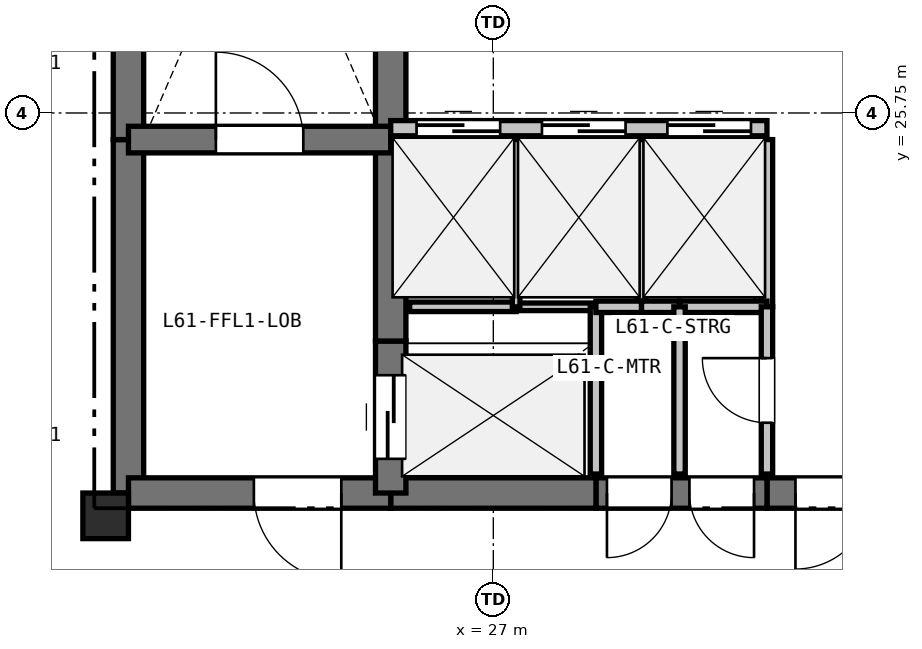
"""IFC4 building model, lengths in metres.
Left out: names, types, materials, properties, quantities, classifications, styles, units other than length and angle.
Written with IfcOpenShell. Run it as: python <this file> out.ifc"""

import sys

from ifc_helpers import new_model, si_unit, direction, frame, frame_2d, origin, origin_2d, place, context, subcontext, project, spatial, rectangle, extrude, element, fill, save


model = new_model("IFC4")
c1 = context("Model", 3, precision=1e-05, world=origin(), true_north=direction((0.0, 1.0)))
c2 = subcontext(c1, "Body", "Model", "MODEL_VIEW")
j1 = project(units=[si_unit("LENGTHUNIT", "METRE"), si_unit("PLANEANGLEUNIT", "RADIAN")], contexts=[c1])
p1 = place(None, origin())
s1 = spatial("IfcSite", under=j1, at=p1, CompositionType="ELEMENT")
p2 = place(p1, origin())
s2 = spatial("IfcBuilding", under=s1, at=p2, CompositionType="ELEMENT")
p3 = place(p2, frame((0.0, 0.0, 218.4)))
s3 = spatial("IfcBuildingStorey", under=s2, at=p3, CompositionType="ELEMENT", Elevation=218.4)
p4 = place(p3, frame((21.9, 20.45, 0.0), z_axis=(0.0, 0.0, 1.0), x_axis=(1.0, 0.0, 0.0)))
e1 = element("IfcColumn", 1, at=p4, inside=s3, PredefinedType="COLUMN", context=c2, shape_type="SweptSolid", body=[
    extrude(rectangle(XDim=0.6, YDim=0.6, at=origin_2d()), origin(), (0.0, 0.0, 1.0), 4.8),
])
p5 = place(p3, frame((22.2, 20.75, 0.0), z_axis=(0.0, 0.0, 1.0), x_axis=(0.0, 1.0, 0.0)))
e2 = element("IfcWall", 2, at=p5, inside=s3, PredefinedType="SHEAR", context=c2, shape_type="SweptSolid", body=[
    extrude(rectangle(XDim=4.65, YDim=0.4, at=frame_2d((2.325, 0.0))), origin(), (0.0, 0.0, 1.0), 4.58),
])
p6 = place(p3, frame((22.2, 25.4, 0.0), z_axis=(0.0, 0.0, 1.0), x_axis=(0.0, 1.0, 0.0)))
e3 = element("IfcWall", 3, at=p6, inside=s3, PredefinedType="SHEAR", context=c2, shape_type="SweptSolid", body=[
    extrude(rectangle(XDim=7.35, YDim=0.4, at=frame_2d((3.675, 0.0))), origin(), (0.0, 0.0, 1.0), 4.58),
])
p7 = place(p3, frame((32.35, 20.75, 0.0), z_axis=(0.0, 0.0, 1.0), x_axis=(-1.0, 0.0, 0.0)))
e4 = element("IfcWall", 4, at=p7, inside=s3, PredefinedType="SHEAR", context=c2, shape_type="SweptSolid", body=[
    extrude(rectangle(XDim=1.75, YDim=0.4, at=frame_2d((0.875, 0.0))), origin(), (0.0, 0.0, 1.0), 4.58),
])
p8 = place(p7, frame((0.375, 0.0, 0.0)))
e5 = element("IfcOpeningElement", 5, at=p8, cuts=e4, PredefinedType="OPENING", context=c2, shape_type="SweptSolid", body=[
    extrude(rectangle(XDim=1.0, YDim=2.15, at=frame_2d((0.5, 1.075))), frame((0.0, 0.21, 0.0), z_axis=(0.0, -1.0, 0.0), x_axis=(1.0, 0.0, 0.0)), (0.0, 0.0, 1.0), 0.42),
])
p9 = place(p3, frame((30.6, 20.75, 0.0), z_axis=(0.0, 0.0, 1.0), x_axis=(-1.0, 0.0, 0.0)))
e6 = element("IfcWall", 6, at=p9, inside=s3, PredefinedType="SHEAR", context=c2, shape_type="SweptSolid", body=[
    extrude(rectangle(XDim=2.25, YDim=0.4, at=frame_2d((1.125, 0.0))), origin(), (0.0, 0.0, 1.0), 4.58),
])
p10 = place(p9, frame((1.255, 0.0, 0.0)))
e7 = element("IfcOpeningElement", 7, at=p10, cuts=e6, PredefinedType="OPENING", context=c2, shape_type="SweptSolid", body=[
    extrude(rectangle(XDim=0.85, YDim=2.1, at=frame_2d((0.425, 1.05))), frame((0.0, 0.21, 0.0), z_axis=(0.0, -1.0, 0.0), x_axis=(1.0, 0.0, 0.0)), (0.0, 0.0, 1.0), 0.42),
])
p11 = place(p9, frame((0.17, 0.0, 0.0)))
e8 = element("IfcOpeningElement", 8, at=p11, cuts=e6, PredefinedType="OPENING", context=c2, shape_type="SweptSolid", body=[
    extrude(rectangle(XDim=0.85, YDim=2.1, at=frame_2d((0.425, 1.05))), frame((0.0, 0.21, 0.0), z_axis=(0.0, -1.0, 0.0), x_axis=(1.0, 0.0, 0.0)), (0.0, 0.0, 1.0), 0.42),
])
p12 = place(p3, frame((28.35, 20.75, 0.0), z_axis=(0.0, 0.0, 1.0), x_axis=(-1.0, 0.0, 0.0)))
e9 = element("IfcWall", 9, at=p12, inside=s3, PredefinedType="SHEAR", context=c2, shape_type="SweptSolid", body=[
    extrude(rectangle(XDim=2.7, YDim=0.4, at=frame_2d((1.35, 0.0))), origin(), (0.0, 0.0, 1.0), 4.58),
])
p13 = place(p3, frame((25.65, 20.75, 0.0), z_axis=(0.0, 0.0, 1.0), x_axis=(-1.0, 0.0, 0.0)))
e10 = element("IfcWall", 10, at=p13, inside=s3, PredefinedType="SHEAR", context=c2, shape_type="SweptSolid", body=[
    extrude(rectangle(XDim=3.45, YDim=0.4, at=frame_2d((1.725, 0.0))), origin(), (0.0, 0.0, 1.0), 4.58),
])
p14 = place(p13, frame((0.65, 0.0, 0.0)))
e11 = element("IfcOpeningElement", 11, at=p14, cuts=e10, PredefinedType="OPENING", context=c2, shape_type="SweptSolid", body=[
    extrude(rectangle(XDim=1.15, YDim=2.15, at=frame_2d((0.575, 1.075))), frame((0.0, 0.21, 0.0), z_axis=(0.0, -1.0, 0.0), x_axis=(1.0, 0.0, 0.0)), (0.0, 0.0, 1.0), 0.42),
])
p15 = place(p3, frame((25.65, 20.75, 0.0), z_axis=(0.0, 0.0, 1.0), x_axis=(0.0, 1.0, 0.0)))
e12 = element("IfcWall", 12, at=p15, inside=s3, PredefinedType="SHEAR", context=c2, shape_type="SweptSolid", body=[
    extrude(rectangle(XDim=2.0, YDim=0.4, at=frame_2d((1.0, 0.0))), origin(), (0.0, 0.0, 1.0), 4.58),
])
p16 = place(p15, frame((0.45, 0.0, 0.0)))
e13 = element("IfcOpeningElement", 13, at=p16, cuts=e12, PredefinedType="OPENING", context=c2, shape_type="SweptSolid", body=[
    extrude(rectangle(XDim=1.1, YDim=2.15, at=frame_2d((0.55, 1.075))), frame((0.0, 0.21, 0.0), z_axis=(0.0, -1.0, 0.0), x_axis=(1.0, 0.0, 0.0)), (0.0, 0.0, 1.0), 0.42),
])
p17 = place(p3, frame((25.65, 22.75, 0.0), z_axis=(0.0, 0.0, 1.0), x_axis=(0.0, 1.0, 0.0)))
e14 = element("IfcWall", 14, at=p17, inside=s3, PredefinedType="SHEAR", context=c2, shape_type="SweptSolid", body=[
    extrude(rectangle(XDim=2.8, YDim=0.4, at=frame_2d((1.4, 0.0))), origin(), (0.0, 0.0, 1.0), 4.58),
])
p18 = place(p3, frame((25.65, 25.55, 0.0), z_axis=(0.0, 0.0, 1.0), x_axis=(0.0, 1.0, 0.0)))
e15 = element("IfcWall", 15, at=p18, inside=s3, PredefinedType="SHEAR", context=c2, shape_type="SweptSolid", body=[
    extrude(rectangle(XDim=2.4, YDim=0.4, at=frame_2d((1.2, 0.0))), origin(), (0.0, 0.0, 1.0), 4.58),
])
p19 = place(p3, frame((22.2, 25.4, 0.0), z_axis=(0.0, 0.0, 1.0), x_axis=(1.0, 0.0, 0.0)))
e16 = element("IfcWall", 16, at=p19, inside=s3, PredefinedType="SHEAR", context=c2, shape_type="SweptSolid", body=[
    extrude(rectangle(XDim=3.45, YDim=0.35, at=frame_2d((1.725, 0.0))), origin(), (0.0, 0.0, 1.0), 4.58),
])
p20 = place(p19, frame((1.15, 0.0, 0.0)))
e17 = element("IfcOpeningElement", 17, at=p20, cuts=e16, PredefinedType="OPENING", context=c2, shape_type="SweptSolid", body=[
    extrude(rectangle(XDim=1.15, YDim=2.15, at=frame_2d((0.575, 1.075))), frame((0.0, 0.185, 0.0), z_axis=(0.0, -1.0, 0.0), x_axis=(1.0, 0.0, 0.0)), (0.0, 0.0, 1.0), 0.37),
])
p21 = place(p3, frame((25.65, 25.55, 0.0), z_axis=(0.0, 0.0, 1.0), x_axis=(1.0, 0.0, 0.0)))
e18 = element("IfcWall", 18, at=p21, inside=s3, PredefinedType="PARTITIONING", context=c2, shape_type="SweptSolid", body=[
    extrude(rectangle(XDim=4.95, YDim=0.2, at=frame_2d((2.475, 0.0))), origin(), (0.0, 0.0, 1.0), 4.58),
])
p22 = place(p21, frame((0.34, 0.0, 0.0)))
e19 = element("IfcOpeningElement", 19, at=p22, cuts=e18, PredefinedType="OPENING", context=c2, shape_type="SweptSolid", body=[
    extrude(rectangle(XDim=1.1, YDim=2.15, at=frame_2d((0.55, 1.075))), frame((0.0, 0.11, 0.0), z_axis=(0.0, -1.0, 0.0), x_axis=(1.0, 0.0, 0.0)), (0.0, 0.0, 1.0), 0.22),
])
p23 = place(p21, frame((1.99, 0.0, 0.0)))
e20 = element("IfcOpeningElement", 20, at=p23, cuts=e18, PredefinedType="OPENING", context=c2, shape_type="SweptSolid", body=[
    extrude(rectangle(XDim=1.1, YDim=2.15, at=frame_2d((0.55, 1.075))), frame((0.0, 0.11, 0.0), z_axis=(0.0, -1.0, 0.0), x_axis=(1.0, 0.0, 0.0)), (0.0, 0.0, 1.0), 0.22),
])
p24 = place(p21, frame((3.64, 0.0, 0.0)))
e21 = element("IfcOpeningElement", 21, at=p24, cuts=e18, PredefinedType="OPENING", context=c2, shape_type="SweptSolid", body=[
    extrude(rectangle(XDim=1.1, YDim=2.15, at=frame_2d((0.55, 1.075))), frame((0.0, 0.11, 0.0), z_axis=(0.0, -1.0, 0.0), x_axis=(1.0, 0.0, 0.0)), (0.0, 0.0, 1.0), 0.22),
])
p25 = place(p3, frame((25.9, 23.2, 0.0), z_axis=(0.0, 0.0, 1.0), x_axis=(1.0, 0.0, 0.0)))
e22 = element("IfcWall", 22, at=p25, inside=s3, PredefinedType="PARTITIONING", context=c2, shape_type="SweptSolid", body=[
    extrude(rectangle(XDim=1.4, YDim=0.125, at=frame_2d((0.7, 0.0))), origin(), (0.0, 0.0, 1.0), 4.58),
])
p26 = place(p3, frame((27.3, 23.2, 0.0), z_axis=(0.0, 0.0, 1.0), x_axis=(1.0, 0.0, 0.0)))
e23 = element("IfcWall", 23, at=p26, inside=s3, PredefinedType="PARTITIONING", context=c2, shape_type="SweptSolid", body=[
    extrude(rectangle(XDim=1.05, YDim=0.1, at=frame_2d((0.525, 0.0))), origin(), (0.0, 0.0, 1.0), 4.58),
])
p27 = place(p3, frame((28.35, 23.2, 0.0), z_axis=(0.0, 0.0, 1.0), x_axis=(0.0, -1.0, 0.0)))
e24 = element("IfcWall", 24, at=p27, inside=s3, PredefinedType="PARTITIONING", context=c2, shape_type="SweptSolid", body=[
    extrude(rectangle(XDim=2.2, YDim=0.15, at=frame_2d((1.1, 0.0))), origin(), (0.0, 0.0, 1.0), 4.58),
])
p28 = place(p3, frame((27.3, 25.4, 0.0), z_axis=(0.0, 0.0, 1.0), x_axis=(0.0, -1.0, 0.0)))
e25 = element("IfcWall", 25, at=p28, inside=s3, PredefinedType="PARTITIONING", context=c2, shape_type="SweptSolid", body=[
    extrude(rectangle(XDim=2.2, YDim=0.1, at=frame_2d((1.1, 0.0))), origin(), (0.0, 0.0, 1.0), 4.58),
])
p29 = place(p3, frame((28.95, 25.4, 0.0), z_axis=(0.0, 0.0, 1.0), x_axis=(0.0, -1.0, 0.0)))
e26 = element("IfcWall", 26, at=p29, inside=s3, PredefinedType="PARTITIONING", context=c2, shape_type="SweptSolid", body=[
    extrude(rectangle(XDim=2.2, YDim=0.125, at=frame_2d((1.1, 0.0))), origin(), (0.0, 0.0, 1.0), 4.58),
])
p30 = place(p3, frame((28.95, 23.2, 0.0), z_axis=(0.0, 0.0, 1.0), x_axis=(-1.0, 0.0, 0.0)))
e27 = element("IfcWall", 27, at=p30, inside=s3, PredefinedType="PARTITIONING", context=c2, shape_type="SweptSolid", body=[
    extrude(rectangle(XDim=0.6, YDim=0.15, at=frame_2d((0.3, 0.0))), origin(), (0.0, 0.0, 1.0), 4.58),
])
p31 = place(p3, frame((30.6, 25.4, 0.0), z_axis=(0.0, 0.0, 1.0), x_axis=(0.0, -1.0, 0.0)))
e28 = element("IfcWall", 28, at=p31, inside=s3, PredefinedType="PARTITIONING", context=c2, shape_type="SweptSolid", body=[
    extrude(rectangle(XDim=2.2, YDim=0.15, at=frame_2d((1.1, 0.0))), origin(), (0.0, 0.0, 1.0), 4.58),
])
p32 = place(p3, frame((30.6, 23.2, 0.0), z_axis=(0.0, 0.0, 1.0), x_axis=(-1.0, 0.0, 0.0)))
e29 = element("IfcWall", 29, at=p32, inside=s3, PredefinedType="PARTITIONING", context=c2, shape_type="SweptSolid", body=[
    extrude(rectangle(XDim=1.15, YDim=0.15, at=frame_2d((0.575, 0.0))), origin(), (0.0, 0.0, 1.0), 4.58),
])
p33 = place(p3, frame((29.45, 23.2, 0.0), z_axis=(0.0, 0.0, 1.0), x_axis=(-1.0, 0.0, 0.0)))
e30 = element("IfcWall", 30, at=p33, inside=s3, PredefinedType="PARTITIONING", context=c2, shape_type="SweptSolid", body=[
    extrude(rectangle(XDim=0.5, YDim=0.15, at=frame_2d((0.25, 0.0))), origin(), (0.0, 0.0, 1.0), 4.58),
])
p34 = place(p3, frame((30.6, 21.0, 0.0), z_axis=(0.0, 0.0, 1.0), x_axis=(0.0, 1.0, 0.0)))
e31 = element("IfcWall", 31, at=p34, inside=s3, PredefinedType="PARTITIONING", context=c2, shape_type="SweptSolid", body=[
    extrude(rectangle(XDim=2.2, YDim=0.15, at=frame_2d((1.1, 0.0))), origin(), (0.0, 0.0, 1.0), 4.58),
])
p35 = place(p34, frame((0.675, 0.0, 0.0)))
e32 = element("IfcOpeningElement", 32, at=p35, cuts=e31, PredefinedType="OPENING", context=c2, shape_type="SweptSolid", body=[
    extrude(rectangle(XDim=0.85, YDim=2.1, at=frame_2d((0.425, 1.05))), frame((0.0, 0.085, 0.0), z_axis=(0.0, -1.0, 0.0), x_axis=(1.0, 0.0, 0.0)), (0.0, 0.0, 1.0), 0.17),
])
p36 = place(p3, frame((29.45, 23.2, 0.0), z_axis=(0.0, 0.0, 1.0), x_axis=(0.0, -1.0, 0.0)))
e33 = element("IfcWall", 33, at=p36, inside=s3, PredefinedType="PARTITIONING", context=c2, shape_type="SweptSolid", body=[
    extrude(rectangle(XDim=2.2, YDim=0.15, at=frame_2d((1.1, 0.0))), origin(), (0.0, 0.0, 1.0), 4.58),
])
p37 = place(p22, origin())
e34 = element("IfcDoor", 34, at=p37, inside=s3, OperationType="SLIDING_TO_LEFT", PredefinedType="DOOR", context=c2, shape_type="SweptSolid", body=[
    extrude(rectangle(XDim=1.1, YDim=2.15, at=frame_2d((0.55, 1.075))), frame((0.0, 0.025, 0.0), z_axis=(0.0, -1.0, 0.0), x_axis=(1.0, 0.0, 0.0)), (0.0, 0.0, 1.0), 0.05),
])
fill(e19, e34)
p38 = place(p23, origin())
e35 = element("IfcDoor", 35, at=p38, inside=s3, OperationType="SLIDING_TO_LEFT", PredefinedType="DOOR", context=c2, shape_type="SweptSolid", body=[
    extrude(rectangle(XDim=1.1, YDim=2.15, at=frame_2d((0.55, 1.075))), frame((0.0, 0.025, 0.0), z_axis=(0.0, -1.0, 0.0), x_axis=(1.0, 0.0, 0.0)), (0.0, 0.0, 1.0), 0.05),
])
fill(e20, e35)
p39 = place(p24, origin())
e36 = element("IfcDoor", 36, at=p39, inside=s3, OperationType="SLIDING_TO_LEFT", PredefinedType="DOOR", context=c2, shape_type="SweptSolid", body=[
    extrude(rectangle(XDim=1.1, YDim=2.15, at=frame_2d((0.55, 1.075))), frame((0.0, 0.025, 0.0), z_axis=(0.0, -1.0, 0.0), x_axis=(1.0, 0.0, 0.0)), (0.0, 0.0, 1.0), 0.05),
])
fill(e21, e36)
p40 = place(p8, origin())
e37 = element("IfcDoor", 37, at=p40, inside=s3, OperationType="SINGLE_SWING_RIGHT", PredefinedType="DOOR", context=c2, shape_type="SweptSolid", body=[
    extrude(rectangle(XDim=1.0, YDim=2.15, at=frame_2d((0.5, 1.075))), frame((0.0, 0.025, 0.0), z_axis=(0.0, -1.0, 0.0), x_axis=(1.0, 0.0, 0.0)), (0.0, 0.0, 1.0), 0.05),
])
fill(e5, e37)
p41 = place(p16, origin())
e38 = element("IfcDoor", 38, at=p41, inside=s3, OperationType="SLIDING_TO_LEFT", PredefinedType="DOOR", context=c2, shape_type="SweptSolid", body=[
    extrude(rectangle(XDim=1.1, YDim=2.15, at=frame_2d((0.55, 1.075))), frame((0.0, 0.025, 0.0), z_axis=(0.0, -1.0, 0.0), x_axis=(1.0, 0.0, 0.0)), (0.0, 0.0, 1.0), 0.05),
])
fill(e13, e38)
p42 = place(p20, origin())
e39 = element("IfcDoor", 39, at=p42, inside=s3, OperationType="SINGLE_SWING_LEFT", PredefinedType="DOOR", context=c2, shape_type="SweptSolid", body=[
    extrude(rectangle(XDim=1.15, YDim=2.15, at=frame_2d((0.575, 1.075))), frame((0.0, 0.025, 0.0), z_axis=(0.0, -1.0, 0.0), x_axis=(1.0, 0.0, 0.0)), (0.0, 0.0, 1.0), 0.05),
])
fill(e17, e39)
p43 = place(p14, origin())
e40 = element("IfcDoor", 40, at=p43, inside=s3, OperationType="SINGLE_SWING_LEFT", PredefinedType="DOOR", context=c2, shape_type="SweptSolid", body=[
    extrude(rectangle(XDim=1.15, YDim=2.15, at=frame_2d((0.575, 1.075))), frame((0.0, 0.025, 0.0), z_axis=(0.0, -1.0, 0.0), x_axis=(1.0, 0.0, 0.0)), (0.0, 0.0, 1.0), 0.05),
])
fill(e11, e40)
p44 = place(p35, origin())
e41 = element("IfcDoor", 41, at=p44, inside=s3, OperationType="SINGLE_SWING_RIGHT", PredefinedType="DOOR", context=c2, shape_type="SweptSolid", body=[
    extrude(rectangle(XDim=0.85, YDim=2.1, at=frame_2d((0.425, 1.05))), frame((0.0, 0.025, 0.0), z_axis=(0.0, -1.0, 0.0), x_axis=(1.0, 0.0, 0.0)), (0.0, 0.0, 1.0), 0.05),
])
fill(e32, e41)
p45 = place(p10, origin())
e42 = element("IfcDoor", 42, at=p45, inside=s3, OperationType="SINGLE_SWING_RIGHT", PredefinedType="DOOR", context=c2, shape_type="SweptSolid", body=[
    extrude(rectangle(XDim=0.85, YDim=2.1, at=frame_2d((0.425, 1.05))), frame((0.0, 0.025, 0.0), z_axis=(0.0, -1.0, 0.0), x_axis=(1.0, 0.0, 0.0)), (0.0, 0.0, 1.0), 0.05),
])
fill(e7, e42)
p46 = place(p11, origin())
e43 = element("IfcDoor", 43, at=p46, inside=s3, OperationType="SINGLE_SWING_LEFT", PredefinedType="DOOR", context=c2, shape_type="SweptSolid", body=[
    extrude(rectangle(XDim=0.85, YDim=2.1, at=frame_2d((0.425, 1.05))), frame((0.0, 0.025, 0.0), z_axis=(0.0, -1.0, 0.0), x_axis=(1.0, 0.0, 0.0)), (0.0, 0.0, 1.0), 0.05),
])
fill(e8, e43)
save(model, sys.argv[1])
